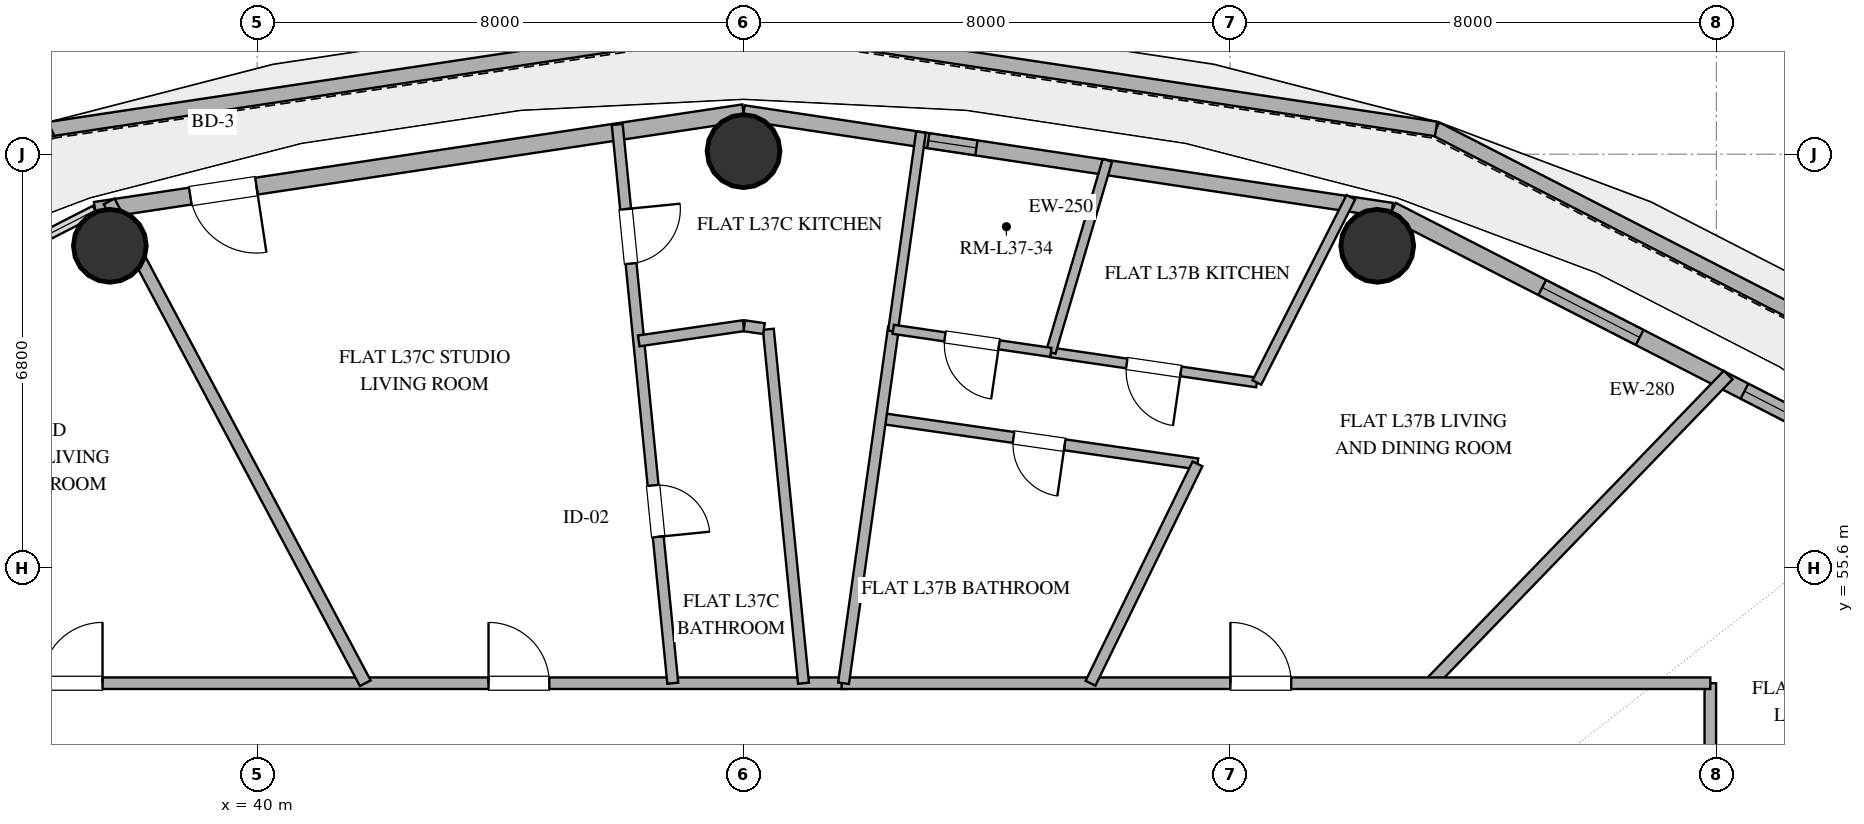
"""IFC4 building model, lengths in metres.
Left out: names, types, materials, properties, quantities, classifications, styles, units other than length and angle.
Written with IfcOpenShell. Run it as: python <this file> out.ifc"""

import sys

from ifc_helpers import new_model, si_unit, direction, frame, frame_2d, origin, origin_2d, place, context, subcontext, project, spatial, rectangle, hollow_circle, extrude, element, fill, save


model = new_model("IFC4")
c1 = context("Model", 3, precision=1e-05, world=origin(), true_north=direction((0.0, 1.0)))
c2 = subcontext(c1, "Body", "Model", "MODEL_VIEW")
j1 = project(units=[si_unit("LENGTHUNIT", "METRE"), si_unit("PLANEANGLEUNIT", "RADIAN")], contexts=[c1])
p1 = place(None, origin())
s1 = spatial("IfcSite", under=j1, at=p1, CompositionType="ELEMENT")
p2 = place(p1, origin())
s2 = spatial("IfcBuilding", under=s1, at=p2, CompositionType="ELEMENT")
p3 = place(p2, frame((0.0, 0.0, 150.6)))
s3 = spatial("IfcBuildingStorey", under=s2, at=p3, CompositionType="ELEMENT", Elevation=150.6)
for number, where, z_axis, x_axis in (
    (1, (58.422, 60.893, 0.0), (0.0, 0.0, 1.0), (1.0, 0.0, 0.0)),
    (2, (48.0, 62.45, 0.0), (0.0, 0.0, 1.0), (1.0, 0.0, 0.0)),
    (3, (37.578, 60.893, 0.0), (0.0, 0.0, 1.0), (1.0, 0.0, 0.0)),
):
    element("IfcColumn", number, at=place(p3, frame(where, z_axis=z_axis, x_axis=x_axis)), inside=s3, PredefinedType="COLUMN", context=c2, shape_type="SweptSolid", body=[
        extrude(hollow_circle(Radius=0.6, WallThickness=0.032, at=origin_2d()), origin(), (0.0, 0.0, 1.0), 3.38),
    ])
p4 = place(p3, frame((68.91, 57.931, 0.0), z_axis=(0.0, 0.0, 1.0), x_axis=(-0.8897661473, 0.456416698992, 0.0)))
e4 = element("IfcWall", 4, at=p4, inside=s3, PredefinedType="PARAPET", context=c2, shape_type="SweptSolid", body=[
    extrude(rectangle(XDim=10.7, YDim=0.24, at=frame_2d((5.35, 0.0))), origin(), (0.0, 0.0, 1.0), 1.25),
])
for number, where, z_axis, x_axis in (
    (5, (59.389, 62.815, 0.0), (0.0, 0.0, 1.0), (-0.989, 0.149, 0.0)),
    (6, (48.0, 64.53, 0.0), (0.0, 0.0, 1.0), (-0.989, -0.149, 0.0)),
):
    element("IfcWall", number, at=place(p3, frame(where, z_axis=z_axis, x_axis=x_axis)), inside=s3, PredefinedType="PARAPET", context=c2, shape_type="SweptSolid", body=[
        extrude(rectangle(XDim=11.518, YDim=0.24, at=frame_2d((5.759, 0.0))), origin(), (0.0, 0.0, 1.0), 1.25),
    ])
p5 = place(p3, frame((36.611, 62.815, 0.0), z_axis=(0.0, 0.0, 1.0), x_axis=(-0.8897661473, -0.456416698992, 0.0)))
e7 = element("IfcWall", 7, at=p5, inside=s3, PredefinedType="PARAPET", context=c2, shape_type="SweptSolid", body=[
    extrude(rectangle(XDim=10.7, YDim=0.24, at=frame_2d((5.35, 0.0))), origin(), (0.0, 0.0, 1.0), 1.25),
])
p6 = place(p3, frame((67.576, 56.906, 0.0), z_axis=(0.0, 0.0, 1.0), x_axis=(-0.889872523182, 0.456209263919, 0.0)))
e8 = element("IfcWall", 8, at=p6, inside=s3, PredefinedType="SOLIDWALL", context=c2, shape_type="SweptSolid", body=[
    extrude(rectangle(XDim=10.016, YDim=0.28, at=frame_2d((5.008, 0.0))), origin(), (0.0, 0.0, 1.0), 3.38),
])
p7 = place(p6, frame((1.7, 0.0, 0.85)))
e9 = element("IfcOpeningElement", 9, at=p7, cuts=e8, PredefinedType="OPENING", context=c2, shape_type="SweptSolid", body=[
    extrude(rectangle(XDim=1.8, YDim=2.2, at=frame_2d((0.9, 1.1))), frame((0.0, 0.15, 0.0), z_axis=(0.0, -1.0, 0.0), x_axis=(1.0, 0.0, 0.0)), (0.0, 0.0, 1.0), 0.3),
])
p8 = place(p6, frame((5.438, 0.0, 0.85)))
e10 = element("IfcOpeningElement", 10, at=p8, cuts=e8, PredefinedType="OPENING", context=c2, shape_type="SweptSolid", body=[
    extrude(rectangle(XDim=1.8, YDim=2.2, at=frame_2d((0.9, 1.1))), frame((0.0, 0.15, 0.0), z_axis=(0.0, -1.0, 0.0), x_axis=(1.0, 0.0, 0.0)), (0.0, 0.0, 1.0), 0.3),
])
p9 = place(p3, frame((58.663, 61.475, 0.0), z_axis=(0.0, 0.0, 1.0), x_axis=(-0.988863993413, 0.148822049884, 0.0)))
e11 = element("IfcWall", 11, at=p9, inside=s3, PredefinedType="SOLIDWALL", context=c2, shape_type="SweptSolid", body=[
    extrude(rectangle(XDim=10.783, YDim=0.25, at=frame_2d((5.392, 0.0))), origin(), (0.0, 0.0, 1.0), 3.38),
])
p10 = place(p9, frame((6.91, 0.0, 1.54)))
e12 = element("IfcOpeningElement", 12, at=p10, cuts=e11, PredefinedType="OPENING", context=c2, shape_type="SweptSolid", body=[
    extrude(rectangle(XDim=0.8, YDim=1.0, at=frame_2d((0.4, 0.5))), frame((0.0, 0.135, 0.0), z_axis=(0.0, -1.0, 0.0), x_axis=(1.0, 0.0, 0.0)), (0.0, 0.0, 1.0), 0.27),
])
p11 = place(p3, frame((48.0, 63.08, 0.0), z_axis=(0.0, 0.0, 1.0), x_axis=(-0.988863993413, -0.148822049884, 0.0)))
e13 = element("IfcWall", 13, at=p11, inside=s3, PredefinedType="SOLIDWALL", context=c2, shape_type="SweptSolid", body=[
    extrude(rectangle(XDim=10.783, YDim=0.28, at=frame_2d((5.392, 0.0))), origin(), (0.0, 0.0, 1.0), 3.38),
])
p12 = place(p11, frame((8.101, 0.0, 0.0)))
e14 = element("IfcOpeningElement", 14, at=p12, cuts=e13, PredefinedType="OPENING", context=c2, shape_type="SweptSolid", body=[
    extrude(rectangle(XDim=1.1, YDim=2.25, at=frame_2d((0.55, 1.125))), frame((0.0, 0.15, 0.0), z_axis=(0.0, -1.0, 0.0), x_axis=(1.0, 0.0, 0.0)), (0.0, 0.0, 1.0), 0.3),
])
p13 = place(p3, frame((32.1, 53.7, 0.0), z_axis=(0.0, 0.0, 1.0), x_axis=(1.0, 0.0, 0.0)))
e15 = element("IfcWall", 15, at=p13, inside=s3, PredefinedType="PARTITIONING", context=c2, shape_type="SweptSolid", body=[
    extrude(rectangle(XDim=17.576, YDim=0.19, at=frame_2d((8.788, 0.0))), origin(), (0.0, 0.0, 1.0), 2.74),
])
p14 = place(p13, frame((4.358, 0.0, 0.0)))
e16 = element("IfcOpeningElement", 16, at=p14, cuts=e15, PredefinedType="OPENING", context=c2, shape_type="SweptSolid", body=[
    extrude(rectangle(XDim=1.0, YDim=2.2, at=frame_2d((0.5, 1.1))), frame((0.0, 0.105, 0.0), z_axis=(0.0, -1.0, 0.0), x_axis=(1.0, 0.0, 0.0)), (0.0, 0.0, 1.0), 0.21),
])
p15 = place(p13, frame((11.706, 0.0, 0.0)))
e17 = element("IfcOpeningElement", 17, at=p15, cuts=e15, PredefinedType="OPENING", context=c2, shape_type="SweptSolid", body=[
    extrude(rectangle(XDim=1.0, YDim=2.2, at=frame_2d((0.5, 1.1))), frame((0.0, 0.105, 0.0), z_axis=(0.0, -1.0, 0.0), x_axis=(1.0, 0.0, 0.0)), (0.0, 0.0, 1.0), 0.21),
])
p16 = place(p3, frame((37.566, 61.624, 0.0), z_axis=(0.0, 0.0, 1.0), x_axis=(0.469466796814, -0.882950126955, 0.0)))
e18 = element("IfcWall", 18, at=p16, inside=s3, PredefinedType="PARTITIONING", context=c2, shape_type="SweptSolid", body=[
    extrude(rectangle(XDim=8.975, YDim=0.2, at=frame_2d((4.487, 0.0))), origin(), (0.0, 0.0, 1.0), 2.74),
])
p17 = place(p3, frame((64.194, 58.769, 0.0), z_axis=(0.0, 0.0, 1.0), x_axis=(-0.694647685064, -0.719350118952, 0.0)))
e19 = element("IfcWall", 19, at=p17, inside=s3, PredefinedType="PARTITIONING", context=c2, shape_type="SweptSolid", body=[
    extrude(rectangle(XDim=7.047, YDim=0.2, at=frame_2d((3.523, 0.0))), origin(), (0.0, 0.0, 1.0), 2.74),
])
p18 = place(p3, frame((63.9, 53.7, 0.0), z_axis=(0.0, 0.0, 1.0), x_axis=(0.0, -1.0, 0.0)))
e20 = element("IfcWall", 20, at=p18, inside=s3, PredefinedType="PARTITIONING", context=c2, shape_type="SweptSolid", body=[
    extrude(rectangle(XDim=10.62, YDim=0.19, at=frame_2d((5.31, 0.0))), origin(), (0.0, 0.0, 1.0), 2.74),
])
p19 = place(p18, frame((2.48, 0.0, 0.0)))
e21 = element("IfcOpeningElement", 21, at=p19, cuts=e20, PredefinedType="OPENING", context=c2, shape_type="SweptSolid", body=[
    extrude(rectangle(XDim=1.0, YDim=2.2, at=frame_2d((0.5, 1.1))), frame((0.0, 0.105, 0.0), z_axis=(0.0, -1.0, 0.0), x_axis=(1.0, 0.0, 0.0)), (0.0, 0.0, 1.0), 0.21),
])
p20 = place(p3, frame((48.407, 59.521, 0.0), z_axis=(0.0, 0.0, 1.0), x_axis=(0.098958231484, -0.995091587956, 0.0)))
e22 = element("IfcWall", 22, at=p20, inside=s3, PredefinedType="PLUMBINGWALL", context=c2, shape_type="SweptSolid", body=[
    extrude(rectangle(XDim=5.85, YDim=0.18, at=frame_2d((2.925, 0.0))), origin(), (0.0, 0.0, 1.0), 2.74),
])
p21 = place(p3, frame((45.922, 62.888, 0.0), z_axis=(0.0, 0.0, 1.0), x_axis=(0.098964435759, -0.995090970944, 0.0)))
e23 = element("IfcWall", 23, at=p21, inside=s3, PredefinedType="PLUMBINGWALL", context=c2, shape_type="SweptSolid", body=[
    extrude(rectangle(XDim=9.234, YDim=0.18, at=frame_2d((4.617, 0.0))), origin(), (0.0, 0.0, 1.0), 2.74),
])
p22 = place(p21, frame((5.964, 0.0, 0.0)))
e24 = element("IfcOpeningElement", 24, at=p22, cuts=e23, PredefinedType="OPENING", context=c2, shape_type="SweptSolid", body=[
    extrude(rectangle(XDim=0.85, YDim=2.1, at=frame_2d((0.425, 1.05))), frame((0.0, 0.1, 0.0), z_axis=(0.0, -1.0, 0.0), x_axis=(1.0, 0.0, 0.0)), (0.0, 0.0, 1.0), 0.2),
])
p23 = place(p21, frame((1.398, 0.0, 0.0)))
e25 = element("IfcOpeningElement", 25, at=p23, cuts=e23, PredefinedType="OPENING", context=c2, shape_type="SweptSolid", body=[
    extrude(rectangle(XDim=0.9, YDim=2.1, at=frame_2d((0.45, 1.05))), frame((0.0, 0.1, 0.0), z_axis=(0.0, -1.0, 0.0), x_axis=(1.0, 0.0, 0.0)), (0.0, 0.0, 1.0), 0.2),
])
p24 = place(p3, frame((49.612, 53.7, 0.0), z_axis=(0.0, 0.0, 1.0), x_axis=(1.0, 0.0, 0.0)))
e26 = element("IfcWall", 26, at=p24, inside=s3, PredefinedType="PARTITIONING", context=c2, shape_type="SweptSolid", body=[
    extrude(rectangle(XDim=14.288, YDim=0.19, at=frame_2d((7.144, 0.0))), origin(), (0.0, 0.0, 1.0), 2.74),
])
p25 = place(p24, frame((6.395, 0.0, 0.0)))
e27 = element("IfcOpeningElement", 27, at=p25, cuts=e26, PredefinedType="OPENING", context=c2, shape_type="SweptSolid", body=[
    extrude(rectangle(XDim=1.0, YDim=2.2, at=frame_2d((0.5, 1.1))), frame((0.0, 0.105, 0.0), z_axis=(0.0, -1.0, 0.0), x_axis=(1.0, 0.0, 0.0)), (0.0, 0.0, 1.0), 0.21),
])
p26 = place(p3, frame((55.466, 57.307, 0.0), z_axis=(0.0, 0.0, 1.0), x_axis=(-0.989825713309, 0.142285126674, 0.0)))
e28 = element("IfcWall", 28, at=p26, inside=s3, PredefinedType="PLUMBINGWALL", context=c2, shape_type="SweptSolid", body=[
    extrude(rectangle(XDim=5.262, YDim=0.18, at=frame_2d((2.631, 0.0))), origin(), (0.0, 0.0, 1.0), 2.74),
])
p27 = place(p26, frame((2.206, 0.0, 0.0)))
e29 = element("IfcOpeningElement", 29, at=p27, cuts=e28, PredefinedType="OPENING", context=c2, shape_type="SweptSolid", body=[
    extrude(rectangle(XDim=0.85, YDim=2.1, at=frame_2d((0.425, 1.05))), frame((0.0, 0.1, 0.0), z_axis=(0.0, -1.0, 0.0), x_axis=(1.0, 0.0, 0.0)), (0.0, 0.0, 1.0), 0.2),
])
p28 = place(p3, frame((50.467, 59.552, 0.0), z_axis=(0.0, 0.0, 1.0), x_axis=(-0.139194058732, -0.990265123093, 0.0)))
e30 = element("IfcWall", 30, at=p28, inside=s3, PredefinedType="PLUMBINGWALL", context=c2, shape_type="SweptSolid", body=[
    extrude(rectangle(XDim=5.909, YDim=0.18, at=frame_2d((2.955, 0.0))), origin(), (0.0, 0.0, 1.0), 2.74),
])
p29 = place(p3, frame((53.707, 53.7, 0.0), z_axis=(0.0, 0.0, 1.0), x_axis=(0.438333733087, 0.898812293217, 0.0)))
e31 = element("IfcWall", 31, at=p29, inside=s3, PredefinedType="PLUMBINGWALL", context=c2, shape_type="SweptSolid", body=[
    extrude(rectangle(XDim=4.013, YDim=0.18, at=frame_2d((2.006, 0.0))), origin(), (0.0, 0.0, 1.0), 2.74),
])
p30 = place(p3, frame((56.442, 58.645, 0.0), z_axis=(0.0, 0.0, 1.0), x_axis=(-0.989476501308, 0.144693653483, 0.0)))
e32 = element("IfcWall", 32, at=p30, inside=s3, PredefinedType="PLUMBINGWALL", context=c2, shape_type="SweptSolid", body=[
    extrude(rectangle(XDim=3.425, YDim=0.16, at=frame_2d((1.713, 0.0))), origin(), (0.0, 0.0, 1.0), 2.74),
])
p31 = place(p30, frame((1.263, 0.0, 0.0)))
e33 = element("IfcOpeningElement", 33, at=p31, cuts=e32, PredefinedType="OPENING", context=c2, shape_type="SweptSolid", body=[
    extrude(rectangle(XDim=0.9, YDim=2.1, at=frame_2d((0.45, 1.05))), frame((0.0, 0.09, 0.0), z_axis=(0.0, -1.0, 0.0), x_axis=(1.0, 0.0, 0.0)), (0.0, 0.0, 1.0), 0.18),
])
p32 = place(p3, frame((57.988, 61.692, 0.0), z_axis=(0.0, 0.0, 1.0), x_axis=(-0.452408261564, -0.89181094682, 0.0)))
e34 = element("IfcWall", 34, at=p32, inside=s3, PredefinedType="PLUMBINGWALL", context=c2, shape_type="SweptSolid", body=[
    extrude(rectangle(XDim=3.417, YDim=0.16, at=frame_2d((1.708, 0.0))), origin(), (0.0, 0.0, 1.0), 2.74),
])
p33 = place(p3, frame((50.918, 62.762, 0.0), z_axis=(0.0, 0.0, 1.0), x_axis=(-0.139198258336, -0.990264532777, 0.0)))
e35 = element("IfcWall", 35, at=p33, inside=s3, PredefinedType="PLUMBINGWALL", context=c2, shape_type="SweptSolid", body=[
    extrude(rectangle(XDim=3.306, YDim=0.16, at=frame_2d((1.653, 0.0))), origin(), (0.0, 0.0, 1.0), 2.74),
])
p34 = place(p3, frame((53.053, 59.141, 0.0), z_axis=(0.0, 0.0, 1.0), x_axis=(0.282828521875, 0.959170489128, 0.0)))
e36 = element("IfcWall", 36, at=p34, inside=s3, PredefinedType="PLUMBINGWALL", context=c2, shape_type="SweptSolid", body=[
    extrude(rectangle(XDim=3.293, YDim=0.16, at=frame_2d((1.646, 0.0))), origin(), (0.0, 0.0, 1.0), 2.74),
])
p35 = place(p3, frame((53.053, 59.141, 0.0), z_axis=(0.0, 0.0, 1.0), x_axis=(-0.989458783037, 0.144814766757, 0.0)))
e37 = element("IfcWall", 37, at=p35, inside=s3, PredefinedType="PARTITIONING", context=c2, shape_type="SweptSolid", body=[
    extrude(rectangle(XDim=2.618, YDim=0.15, at=frame_2d((1.309, 0.0))), origin(), (0.0, 0.0, 1.0), 2.74),
])
p36 = place(p35, frame((0.859, 0.0, 0.0)))
e38 = element("IfcOpeningElement", 38, at=p36, cuts=e37, PredefinedType="OPENING", context=c2, shape_type="SweptSolid", body=[
    extrude(rectangle(XDim=0.9, YDim=2.1, at=frame_2d((0.45, 1.05))), frame((0.0, 0.085, 0.0), z_axis=(0.0, -1.0, 0.0), x_axis=(1.0, 0.0, 0.0)), (0.0, 0.0, 1.0), 0.17),
])
p37 = place(p3, frame((46.276, 59.33, 0.0), z_axis=(0.0, 0.0, 1.0), x_axis=(0.989604582355, 0.143815056869, 0.0)))
e39 = element("IfcWall", 39, at=p37, inside=s3, PredefinedType="PLUMBINGWALL", context=c2, shape_type="SweptSolid", body=[
    extrude(rectangle(XDim=1.742, YDim=0.18, at=frame_2d((0.871, 0.0))), origin(), (0.0, 0.0, 1.0), 2.74),
])
p38 = place(p3, frame((48.012, 59.578, 0.0), z_axis=(0.0, 0.0, 1.0), x_axis=(0.989603801202, -0.143820431952, 0.0)))
e40 = element("IfcWall", 40, at=p38, inside=s3, PredefinedType="PLUMBINGWALL", context=c2, shape_type="SweptSolid", body=[
    extrude(rectangle(XDim=0.328, YDim=0.18, at=frame_2d((0.164, 0.0))), origin(), (0.0, 0.0, 1.0), 2.74),
])
p39 = place(p7, origin())
e41 = element("IfcWindow", 41, at=p39, inside=s3, PartitioningType="SINGLE_PANEL", PredefinedType="WINDOW", context=c2, shape_type="SweptSolid", body=[
    extrude(rectangle(XDim=1.8, YDim=2.2, at=frame_2d((0.9, 1.1))), frame((0.0, 0.03, 0.0), z_axis=(0.0, -1.0, 0.0), x_axis=(1.0, 0.0, 0.0)), (0.0, 0.0, 1.0), 0.06),
])
fill(e9, e41)
p40 = place(p8, origin())
e42 = element("IfcWindow", 42, at=p40, inside=s3, PartitioningType="SINGLE_PANEL", PredefinedType="WINDOW", context=c2, shape_type="SweptSolid", body=[
    extrude(rectangle(XDim=1.8, YDim=2.2, at=frame_2d((0.9, 1.1))), frame((0.0, 0.03, 0.0), z_axis=(0.0, -1.0, 0.0), x_axis=(1.0, 0.0, 0.0)), (0.0, 0.0, 1.0), 0.06),
])
fill(e10, e42)
p41 = place(p12, origin())
e43 = element("IfcDoor", 43, at=p41, inside=s3, OperationType="SINGLE_SWING_LEFT", PredefinedType="DOOR", context=c2, shape_type="SweptSolid", body=[
    extrude(rectangle(XDim=1.1, YDim=2.25, at=frame_2d((0.55, 1.125))), frame((0.0, 0.025, 0.0), z_axis=(0.0, -1.0, 0.0), x_axis=(1.0, 0.0, 0.0)), (0.0, 0.0, 1.0), 0.05),
])
fill(e14, e43)
p42 = place(p10, origin())
e44 = element("IfcWindow", 44, at=p42, inside=s3, PartitioningType="SINGLE_PANEL", PredefinedType="WINDOW", context=c2, shape_type="SweptSolid", body=[
    extrude(rectangle(XDim=0.8, YDim=1.0, at=frame_2d((0.4, 0.5))), frame((0.0, 0.03, 0.0), z_axis=(0.0, -1.0, 0.0), x_axis=(1.0, 0.0, 0.0)), (0.0, 0.0, 1.0), 0.06),
])
fill(e12, e44)
p43 = place(p14, origin())
e45 = element("IfcDoor", 45, at=p43, inside=s3, OperationType="SINGLE_SWING_RIGHT", PredefinedType="DOOR", context=c2, shape_type="SweptSolid", body=[
    extrude(rectangle(XDim=1.0, YDim=2.2, at=frame_2d((0.5, 1.1))), frame((0.0, 0.025, 0.0), z_axis=(0.0, -1.0, 0.0), x_axis=(1.0, 0.0, 0.0)), (0.0, 0.0, 1.0), 0.05),
])
fill(e16, e45)
p44 = place(p15, origin())
e46 = element("IfcDoor", 46, at=p44, inside=s3, OperationType="SINGLE_SWING_LEFT", PredefinedType="DOOR", context=c2, shape_type="SweptSolid", body=[
    extrude(rectangle(XDim=1.0, YDim=2.2, at=frame_2d((0.5, 1.1))), frame((0.0, 0.025, 0.0), z_axis=(0.0, -1.0, 0.0), x_axis=(1.0, 0.0, 0.0)), (0.0, 0.0, 1.0), 0.05),
])
fill(e17, e46)
p45 = place(p22, origin())
e47 = element("IfcDoor", 47, at=p45, inside=s3, OperationType="SINGLE_SWING_RIGHT", PredefinedType="DOOR", context=c2, shape_type="SweptSolid", body=[
    extrude(rectangle(XDim=0.85, YDim=2.1, at=frame_2d((0.425, 1.05))), frame((0.0, 0.025, 0.0), z_axis=(0.0, -1.0, 0.0), x_axis=(1.0, 0.0, 0.0)), (0.0, 0.0, 1.0), 0.05),
])
fill(e24, e47)
p46 = place(p23, origin())
e48 = element("IfcDoor", 48, at=p46, inside=s3, OperationType="SINGLE_SWING_LEFT", PredefinedType="DOOR", context=c2, shape_type="SweptSolid", body=[
    extrude(rectangle(XDim=0.9, YDim=2.1, at=frame_2d((0.45, 1.05))), frame((0.0, 0.025, 0.0), z_axis=(0.0, -1.0, 0.0), x_axis=(1.0, 0.0, 0.0)), (0.0, 0.0, 1.0), 0.05),
])
fill(e25, e48)
p47 = place(p25, origin())
e49 = element("IfcDoor", 49, at=p47, inside=s3, OperationType="SINGLE_SWING_LEFT", PredefinedType="DOOR", context=c2, shape_type="SweptSolid", body=[
    extrude(rectangle(XDim=1.0, YDim=2.2, at=frame_2d((0.5, 1.1))), frame((0.0, 0.025, 0.0), z_axis=(0.0, -1.0, 0.0), x_axis=(1.0, 0.0, 0.0)), (0.0, 0.0, 1.0), 0.05),
])
fill(e27, e49)
p48 = place(p27, origin())
e50 = element("IfcDoor", 50, at=p48, inside=s3, OperationType="SINGLE_SWING_LEFT", PredefinedType="DOOR", context=c2, shape_type="SweptSolid", body=[
    extrude(rectangle(XDim=0.85, YDim=2.1, at=frame_2d((0.425, 1.05))), frame((0.0, 0.025, 0.0), z_axis=(0.0, -1.0, 0.0), x_axis=(1.0, 0.0, 0.0)), (0.0, 0.0, 1.0), 0.05),
])
fill(e29, e50)
p49 = place(p31, origin())
e51 = element("IfcDoor", 51, at=p49, inside=s3, OperationType="SINGLE_SWING_LEFT", PredefinedType="DOOR", context=c2, shape_type="SweptSolid", body=[
    extrude(rectangle(XDim=0.9, YDim=2.1, at=frame_2d((0.45, 1.05))), frame((0.0, 0.025, 0.0), z_axis=(0.0, -1.0, 0.0), x_axis=(1.0, 0.0, 0.0)), (0.0, 0.0, 1.0), 0.05),
])
fill(e33, e51)
p50 = place(p36, origin())
e52 = element("IfcDoor", 52, at=p50, inside=s3, OperationType="SINGLE_SWING_LEFT", PredefinedType="DOOR", context=c2, shape_type="SweptSolid", body=[
    extrude(rectangle(XDim=0.9, YDim=2.1, at=frame_2d((0.45, 1.05))), frame((0.0, 0.025, 0.0), z_axis=(0.0, -1.0, 0.0), x_axis=(1.0, 0.0, 0.0)), (0.0, 0.0, 1.0), 0.05),
])
fill(e38, e52)
save(model, sys.argv[1])
